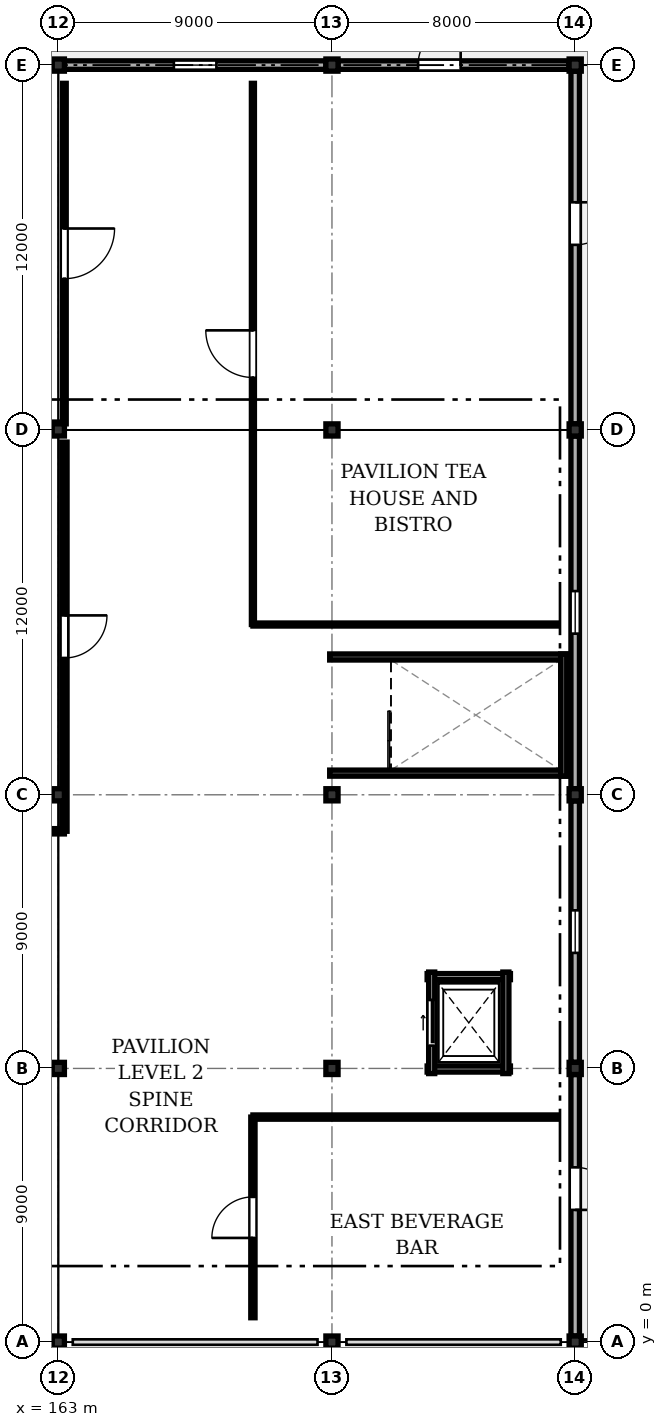
"""IFC4 building model, lengths in metres.
Left out: names, types, materials, properties, quantities, classifications, styles, units other than length and angle.
Written with IfcOpenShell. Run it as: python <this file> out.ifc"""

import sys

from ifc_helpers import new_model, si_unit, direction, frame, frame_2d, origin, origin_2d, place, context, subcontext, project, spatial, rectangle, i_section, extrude, element, fill, save


model = new_model("IFC4")
c1 = context("Model", 3, precision=1e-05, world=origin(), true_north=direction((0.0, 1.0)))
c2 = subcontext(c1, "Body", "Model", "MODEL_VIEW")
j1 = project(units=[si_unit("LENGTHUNIT", "METRE"), si_unit("PLANEANGLEUNIT", "RADIAN")], contexts=[c1])
p1 = place(None, origin())
s1 = spatial("IfcSite", under=j1, at=p1, CompositionType="ELEMENT")
p2 = place(p1, origin())
s2 = spatial("IfcBuilding", under=s1, at=p2, CompositionType="ELEMENT")
p3 = place(p2, frame((0.0, 0.0, 10.8)))
s3 = spatial("IfcBuildingStorey", under=s2, at=p3, CompositionType="ELEMENT", Elevation=10.8)
for number, where, z_axis, x_axis in (
    (1, (163.0, 0.0, 0.0), (0.0, 0.0, 1.0), (1.0, 0.0, 0.0)),
    (2, (163.0, 9.0, 0.0), (0.0, 0.0, 1.0), (1.0, 0.0, 0.0)),
    (3, (163.0, 18.0, 0.0), (0.0, 0.0, 1.0), (1.0, 0.0, 0.0)),
    (4, (163.0, 30.0, 0.0), (0.0, 0.0, 1.0), (1.0, 0.0, 0.0)),
    (5, (163.0, 42.0, 0.0), (0.0, 0.0, 1.0), (1.0, 0.0, 0.0)),
    (6, (172.0, 0.0, 0.0), (0.0, 0.0, 1.0), (1.0, 0.0, 0.0)),
    (7, (172.0, 9.0, 0.0), (0.0, 0.0, 1.0), (1.0, 0.0, 0.0)),
    (8, (172.0, 18.0, 0.0), (0.0, 0.0, 1.0), (1.0, 0.0, 0.0)),
    (9, (172.0, 30.0, 0.0), (0.0, 0.0, 1.0), (1.0, 0.0, 0.0)),
    (10, (172.0, 42.0, 0.0), (0.0, 0.0, 1.0), (1.0, 0.0, 0.0)),
    (11, (180.0, 0.0, 0.0), (0.0, 0.0, 1.0), (1.0, 0.0, 0.0)),
    (12, (180.0, 9.0, 0.0), (0.0, 0.0, 1.0), (1.0, 0.0, 0.0)),
    (13, (180.0, 18.0, 0.0), (0.0, 0.0, 1.0), (1.0, 0.0, 0.0)),
    (14, (180.0, 30.0, 0.0), (0.0, 0.0, 1.0), (1.0, 0.0, 0.0)),
    (15, (180.0, 42.0, 0.0), (0.0, 0.0, 1.0), (1.0, 0.0, 0.0)),
):
    element("IfcColumn", number, at=place(p3, frame(where, z_axis=z_axis, x_axis=x_axis)), inside=s3, PredefinedType="COLUMN", context=c2, shape_type="SweptSolid", body=[
        extrude(i_section(OverallWidth=0.4, OverallDepth=0.4, WebThickness=0.013, FlangeThickness=0.021, FilletRadius=0.022, at=origin_2d()), origin(), (0.0, 0.0, 1.0), 3.6),
    ])
p4 = place(p3, frame((163.2, 42.0, 0.0), z_axis=(0.0, 0.0, 1.0), x_axis=(1.0, 0.0, 0.0)))
e16 = element("IfcWall", 16, at=p4, inside=s3, PredefinedType="SOLIDWALL", context=c2, shape_type="SweptSolid", body=[
    extrude(rectangle(XDim=8.6, YDim=0.28, at=frame_2d((4.3, 0.0))), origin(), (0.0, 0.0, 1.0), 2.795),
])
p5 = place(p4, frame((3.6, 0.0, 0.75)))
e17 = element("IfcOpeningElement", 17, at=p5, cuts=e16, PredefinedType="OPENING", context=c2, shape_type="SweptSolid", body=[
    extrude(rectangle(XDim=1.4, YDim=1.55, at=frame_2d((0.7, 0.775))), frame((0.0, 0.15, 0.0), z_axis=(0.0, -1.0, 0.0), x_axis=(1.0, 0.0, 0.0)), (0.0, 0.0, 1.0), 0.3),
])
p6 = place(p3, frame((172.2, 42.0, 0.0), z_axis=(0.0, 0.0, 1.0), x_axis=(1.0, 0.0, 0.0)))
e18 = element("IfcWall", 18, at=p6, inside=s3, PredefinedType="SOLIDWALL", context=c2, shape_type="SweptSolid", body=[
    extrude(rectangle(XDim=7.6, YDim=0.28, at=frame_2d((3.8, 0.0))), origin(), (0.0, 0.0, 1.0), 2.795),
])
p7 = place(p6, frame((2.633, 0.0, 0.0)))
e19 = element("IfcOpeningElement", 19, at=p7, cuts=e18, PredefinedType="OPENING", context=c2, shape_type="SweptSolid", body=[
    extrude(rectangle(XDim=1.4, YDim=2.25, at=frame_2d((0.7, 1.125))), frame((0.0, 0.15, 0.0), z_axis=(0.0, -1.0, 0.0), x_axis=(1.0, 0.0, 0.0)), (0.0, 0.0, 1.0), 0.3),
])
p8 = place(p3, frame((180.0, 41.8, 0.0), z_axis=(0.0, 0.0, 1.0), x_axis=(0.0, -1.0, 0.0)))
e20 = element("IfcWall", 20, at=p8, inside=s3, PredefinedType="SOLIDWALL", context=c2, shape_type="SweptSolid", body=[
    extrude(rectangle(XDim=11.6, YDim=0.28, at=frame_2d((5.8, 0.0))), origin(), (0.0, 0.0, 1.0), 2.795),
])
p9 = place(p8, frame((4.313, 0.0, 0.0)))
e21 = element("IfcOpeningElement", 21, at=p9, cuts=e20, PredefinedType="OPENING", context=c2, shape_type="SweptSolid", body=[
    extrude(rectangle(XDim=1.4, YDim=2.25, at=frame_2d((0.7, 1.125))), frame((0.0, 0.15, 0.0), z_axis=(0.0, -1.0, 0.0), x_axis=(1.0, 0.0, 0.0)), (0.0, 0.0, 1.0), 0.3),
])
p10 = place(p3, frame((180.0, 29.8, 0.0), z_axis=(0.0, 0.0, 1.0), x_axis=(0.0, -1.0, 0.0)))
e22 = element("IfcWall", 22, at=p10, inside=s3, PredefinedType="SOLIDWALL", context=c2, shape_type="SweptSolid", body=[
    extrude(rectangle(XDim=11.6, YDim=0.28, at=frame_2d((5.8, 0.0))), origin(), (0.0, 0.0, 1.0), 2.795),
])
p11 = place(p10, frame((5.1, 0.0, 0.75)))
e23 = element("IfcOpeningElement", 23, at=p11, cuts=e22, PredefinedType="OPENING", context=c2, shape_type="SweptSolid", body=[
    extrude(rectangle(XDim=1.4, YDim=1.55, at=frame_2d((0.7, 0.775))), frame((0.0, 0.15, 0.0), z_axis=(0.0, -1.0, 0.0), x_axis=(1.0, 0.0, 0.0)), (0.0, 0.0, 1.0), 0.3),
])
p12 = place(p3, frame((180.0, 17.8, 0.0), z_axis=(0.0, 0.0, 1.0), x_axis=(0.0, -1.0, 0.0)))
e24 = element("IfcWall", 24, at=p12, inside=s3, PredefinedType="SOLIDWALL", context=c2, shape_type="SweptSolid", body=[
    extrude(rectangle(XDim=8.6, YDim=0.28, at=frame_2d((4.3, 0.0))), origin(), (0.0, 0.0, 1.0), 2.795),
])
p13 = place(p12, frame((3.6, 0.0, 0.75)))
e25 = element("IfcOpeningElement", 25, at=p13, cuts=e24, PredefinedType="OPENING", context=c2, shape_type="SweptSolid", body=[
    extrude(rectangle(XDim=1.4, YDim=1.55, at=frame_2d((0.7, 0.775))), frame((0.0, 0.15, 0.0), z_axis=(0.0, -1.0, 0.0), x_axis=(1.0, 0.0, 0.0)), (0.0, 0.0, 1.0), 0.3),
])
p14 = place(p3, frame((180.0, 8.8, 0.0), z_axis=(0.0, 0.0, 1.0), x_axis=(0.0, -1.0, 0.0)))
e26 = element("IfcWall", 26, at=p14, inside=s3, PredefinedType="SOLIDWALL", context=c2, shape_type="SweptSolid", body=[
    extrude(rectangle(XDim=8.6, YDim=0.28, at=frame_2d((4.3, 0.0))), origin(), (0.0, 0.0, 1.0), 2.885),
])
p15 = place(p14, frame((3.053, 0.0, 0.0)))
e27 = element("IfcOpeningElement", 27, at=p15, cuts=e26, PredefinedType="OPENING", context=c2, shape_type="SweptSolid", body=[
    extrude(rectangle(XDim=1.4, YDim=2.25, at=frame_2d((0.7, 1.125))), frame((0.0, 0.15, 0.0), z_axis=(0.0, -1.0, 0.0), x_axis=(1.0, 0.0, 0.0)), (0.0, 0.0, 1.0), 0.3),
])
for number, where, z_axis, x_axis in (
    (28, (171.925, 18.712, 0.0), (0.0, 0.0, 1.0), (1.0, 0.0, 0.0)),
    (29, (179.722, 22.532, 0.0), (0.0, 0.0, 1.0), (-1.0, 0.0, 0.0)),
):
    element("IfcWall", number, at=place(p3, frame(where, z_axis=z_axis, x_axis=x_axis)), inside=s3, PredefinedType="SOLIDWALL", context=c2, shape_type="SweptSolid", body=[
        extrude(rectangle(XDim=7.797, YDim=0.2, at=frame_2d((3.899, 0.0))), origin(), (0.0, 0.0, 1.0), 1.25),
    ])
p16 = place(p3, frame((179.623, 18.613, 0.0), z_axis=(0.0, 0.0, 1.0), x_axis=(0.0, 1.0, 0.0)))
e30 = element("IfcWall", 30, at=p16, inside=s3, PredefinedType="SOLIDWALL", context=c2, shape_type="SweptSolid", body=[
    extrude(rectangle(XDim=4.02, YDim=0.2, at=frame_2d((2.01, 0.0))), origin(), (0.0, 0.0, 1.0), 1.25),
])
for number, where, z_axis, x_axis in (
    (31, (175.13, 8.98, 0.0), (0.0, 0.0, 1.0), (1.0, 0.0, 0.0)),
    (32, (177.87, 12.02, 0.0), (0.0, 0.0, 1.0), (-1.0, 0.0, 0.0)),
):
    element("IfcWall", number, at=place(p3, frame(where, z_axis=z_axis, x_axis=x_axis)), inside=s3, PredefinedType="SOLIDWALL", context=c2, shape_type="SweptSolid", body=[
        extrude(rectangle(XDim=2.74, YDim=0.2, at=frame_2d((1.37, 0.0))), origin(), (0.0, 0.0, 1.0), 3.345),
    ])
p17 = place(p3, frame((175.28, 12.17, 0.0), z_axis=(0.0, 0.0, 1.0), x_axis=(0.0, -1.0, 0.0)))
e33 = element("IfcWall", 33, at=p17, inside=s3, PredefinedType="SOLIDWALL", context=c2, shape_type="SweptSolid", body=[
    extrude(rectangle(XDim=3.34, YDim=0.2, at=frame_2d((1.67, 0.0))), origin(), (0.0, 0.0, 1.0), 3.345),
])
p18 = place(p17, frame((0.92, 0.0, 0.0)))
e34 = element("IfcOpeningElement", 34, at=p18, cuts=e33, PredefinedType="OPENING", context=c2, shape_type="SweptSolid", body=[
    extrude(rectangle(XDim=1.5, YDim=2.2, at=frame_2d((0.75, 1.1))), frame((0.0, 0.11, 0.0), z_axis=(0.0, -1.0, 0.0), x_axis=(1.0, 0.0, 0.0)), (0.0, 0.0, 1.0), 0.22),
])
p19 = place(p3, frame((177.72, 8.83, 0.0), z_axis=(0.0, 0.0, 1.0), x_axis=(0.0, 1.0, 0.0)))
e35 = element("IfcWall", 35, at=p19, inside=s3, PredefinedType="SOLIDWALL", context=c2, shape_type="SweptSolid", body=[
    extrude(rectangle(XDim=3.34, YDim=0.2, at=frame_2d((1.67, 0.0))), origin(), (0.0, 0.0, 1.0), 3.345),
])
p20 = place(p3, frame((163.2, 30.2, 0.0), z_axis=(0.0, 0.0, 1.0), x_axis=(-1.0, 0.0, 0.0)))
e36 = element("IfcWall", 36, at=p20, inside=s3, PredefinedType="PARTITIONING", context=c2, shape_type="SweptSolid", body=[
    extrude(rectangle(XDim=26.4, YDim=0.12, at=frame_2d((13.2, 0.0))), origin(), (0.0, 0.0, 1.0), 2.795),
])
p21 = place(p3, frame((163.2, 41.4, 0.0), z_axis=(0.0, 0.0, 1.0), x_axis=(0.0, -1.0, 0.0)))
e37 = element("IfcWall", 37, at=p21, inside=s3, PredefinedType="PARTITIONING", context=c2, shape_type="SweptSolid", body=[
    extrude(rectangle(XDim=11.2, YDim=0.12, at=frame_2d((5.6, 0.0))), origin(), (0.0, 0.0, 1.0), 2.795),
])
p22 = place(p21, frame((4.775, 0.0, 0.0)))
e38 = element("IfcOpeningElement", 38, at=p22, cuts=e37, PredefinedType="OPENING", context=c2, shape_type="SweptSolid", body=[
    extrude(rectangle(XDim=1.65, YDim=2.1, at=frame_2d((0.825, 1.05))), frame((0.0, 0.07, 0.0), z_axis=(0.0, -1.0, 0.0), x_axis=(1.0, 0.0, 0.0)), (0.0, 0.0, 1.0), 0.14),
])
p23 = place(p3, frame((179.4, 23.6, 0.0), z_axis=(0.0, 0.0, 1.0), x_axis=(-1.0, 0.0, 0.0)))
e39 = element("IfcWall", 39, at=p23, inside=s3, PredefinedType="PARTITIONING", context=c2, shape_type="SweptSolid", body=[
    extrude(rectangle(XDim=10.0, YDim=0.1, at=frame_2d((5.0, 0.0))), origin(), (0.0, 0.0, 1.0), 2.795),
])
p24 = place(p3, frame((169.4, 23.6, 0.0), z_axis=(0.0, 0.0, 1.0), x_axis=(0.0, 1.0, 0.0)))
e40 = element("IfcWall", 40, at=p24, inside=s3, PredefinedType="PARTITIONING", context=c2, shape_type="SweptSolid", body=[
    extrude(rectangle(XDim=17.8, YDim=0.1, at=frame_2d((8.9, 0.0))), origin(), (0.0, 0.0, 1.0), 2.905),
])
p25 = place(p24, frame((8.125, 0.0, 0.0)))
e41 = element("IfcOpeningElement", 41, at=p25, cuts=e40, PredefinedType="OPENING", context=c2, shape_type="SweptSolid", body=[
    extrude(rectangle(XDim=1.55, YDim=2.1, at=frame_2d((0.775, 1.05))), frame((0.0, 0.06, 0.0), z_axis=(0.0, -1.0, 0.0), x_axis=(1.0, 0.0, 0.0)), (0.0, 0.0, 1.0), 0.12),
])
p26 = place(p3, frame((163.2, 16.8, 0.0), z_axis=(0.0, 0.0, 1.0), x_axis=(-1.0, 0.0, 0.0)))
e42 = element("IfcWall", 42, at=p26, inside=s3, PredefinedType="PARTITIONING", context=c2, shape_type="SweptSolid", body=[
    extrude(rectangle(XDim=10.6, YDim=0.175, at=frame_2d((5.3, 0.0))), origin(), (0.0, 0.0, 1.0), 2.985),
])
p27 = place(p3, frame((163.2, 29.6, 0.0), z_axis=(0.0, 0.0, 1.0), x_axis=(0.0, -1.0, 0.0)))
e43 = element("IfcWall", 43, at=p27, inside=s3, PredefinedType="PARTITIONING", context=c2, shape_type="SweptSolid", body=[
    extrude(rectangle(XDim=12.8, YDim=0.175, at=frame_2d((6.4, 0.0))), origin(), (0.0, 0.0, 1.0), 2.795),
])
p28 = place(p27, frame((5.7, 0.0, 0.0)))
e44 = element("IfcOpeningElement", 44, at=p28, cuts=e43, PredefinedType="OPENING", context=c2, shape_type="SweptSolid", body=[
    extrude(rectangle(XDim=1.4, YDim=2.1, at=frame_2d((0.7, 1.05))), frame((0.0, 0.097, 0.0), z_axis=(0.0, -1.0, 0.0), x_axis=(1.0, 0.0, 0.0)), (0.0, 0.0, 1.0), 0.195),
])
p29 = place(p3, frame((169.4, 7.4, 0.0), z_axis=(0.0, 0.0, 1.0), x_axis=(1.0, 0.0, 0.0)))
e45 = element("IfcWall", 45, at=p29, inside=s3, PredefinedType="PARTITIONING", context=c2, shape_type="SweptSolid", body=[
    extrude(rectangle(XDim=10.0, YDim=0.14, at=frame_2d((5.0, 0.0))), origin(), (0.0, 0.0, 1.0), 2.955),
])
p30 = place(p3, frame((169.4, 0.8, 0.0), z_axis=(0.0, 0.0, 1.0), x_axis=(0.0, 1.0, 0.0)))
e46 = element("IfcWall", 46, at=p30, inside=s3, PredefinedType="PARTITIONING", context=c2, shape_type="SweptSolid", body=[
    extrude(rectangle(XDim=6.6, YDim=0.14, at=frame_2d((3.3, 0.0))), origin(), (0.0, 0.0, 1.0), 2.915),
])
p31 = place(p30, frame((2.625, 0.0, 0.0)))
e47 = element("IfcOpeningElement", 47, at=p31, cuts=e46, PredefinedType="OPENING", context=c2, shape_type="SweptSolid", body=[
    extrude(rectangle(XDim=1.35, YDim=2.1, at=frame_2d((0.675, 1.05))), frame((0.0, 0.08, 0.0), z_axis=(0.0, -1.0, 0.0), x_axis=(1.0, 0.0, 0.0)), (0.0, 0.0, 1.0), 0.16),
])
p32 = place(p5, origin())
e48 = element("IfcWindow", 48, at=p32, inside=s3, PartitioningType="SINGLE_PANEL", PredefinedType="WINDOW", context=c2, shape_type="SweptSolid", body=[
    extrude(rectangle(XDim=1.4, YDim=1.55, at=frame_2d((0.7, 0.775))), frame((0.0, 0.03, 0.0), z_axis=(0.0, -1.0, 0.0), x_axis=(1.0, 0.0, 0.0)), (0.0, 0.0, 1.0), 0.06),
])
fill(e17, e48)
p33 = place(p7, origin())
e49 = element("IfcDoor", 49, at=p33, inside=s3, OperationType="SINGLE_SWING_RIGHT", PredefinedType="DOOR", context=c2, shape_type="SweptSolid", body=[
    extrude(rectangle(XDim=1.4, YDim=2.25, at=frame_2d((0.7, 1.125))), frame((0.0, 0.025, 0.0), z_axis=(0.0, -1.0, 0.0), x_axis=(1.0, 0.0, 0.0)), (0.0, 0.0, 1.0), 0.05),
])
fill(e19, e49)
p34 = place(p9, origin())
e50 = element("IfcDoor", 50, at=p34, inside=s3, OperationType="SINGLE_SWING_LEFT", PredefinedType="DOOR", context=c2, shape_type="SweptSolid", body=[
    extrude(rectangle(XDim=1.4, YDim=2.25, at=frame_2d((0.7, 1.125))), frame((0.0, 0.025, 0.0), z_axis=(0.0, -1.0, 0.0), x_axis=(1.0, 0.0, 0.0)), (0.0, 0.0, 1.0), 0.05),
])
fill(e21, e50)
p35 = place(p11, origin())
e51 = element("IfcWindow", 51, at=p35, inside=s3, PartitioningType="SINGLE_PANEL", PredefinedType="WINDOW", context=c2, shape_type="SweptSolid", body=[
    extrude(rectangle(XDim=1.4, YDim=1.55, at=frame_2d((0.7, 0.775))), frame((0.0, 0.03, 0.0), z_axis=(0.0, -1.0, 0.0), x_axis=(1.0, 0.0, 0.0)), (0.0, 0.0, 1.0), 0.06),
])
fill(e23, e51)
p36 = place(p13, origin())
e52 = element("IfcWindow", 52, at=p36, inside=s3, PartitioningType="SINGLE_PANEL", PredefinedType="WINDOW", context=c2, shape_type="SweptSolid", body=[
    extrude(rectangle(XDim=1.4, YDim=1.55, at=frame_2d((0.7, 0.775))), frame((0.0, 0.03, 0.0), z_axis=(0.0, -1.0, 0.0), x_axis=(1.0, 0.0, 0.0)), (0.0, 0.0, 1.0), 0.06),
])
fill(e25, e52)
p37 = place(p15, origin())
e53 = element("IfcDoor", 53, at=p37, inside=s3, OperationType="SINGLE_SWING_RIGHT", PredefinedType="DOOR", context=c2, shape_type="SweptSolid", body=[
    extrude(rectangle(XDim=1.4, YDim=2.25, at=frame_2d((0.7, 1.125))), frame((0.0, 0.025, 0.0), z_axis=(0.0, -1.0, 0.0), x_axis=(1.0, 0.0, 0.0)), (0.0, 0.0, 1.0), 0.05),
])
fill(e27, e53)
p38 = place(p18, origin())
e54 = element("IfcDoor", 54, at=p38, inside=s3, OperationType="SLIDING_TO_LEFT", PredefinedType="DOOR", context=c2, shape_type="SweptSolid", body=[
    extrude(rectangle(XDim=1.5, YDim=2.2, at=frame_2d((0.75, 1.1))), frame((0.0, 0.025, 0.0), z_axis=(0.0, -1.0, 0.0), x_axis=(1.0, 0.0, 0.0)), (0.0, 0.0, 1.0), 0.05),
])
fill(e34, e54)
p39 = place(p22, origin())
e55 = element("IfcDoor", 55, at=p39, inside=s3, OperationType="SINGLE_SWING_LEFT", PredefinedType="DOOR", context=c2, shape_type="SweptSolid", body=[
    extrude(rectangle(XDim=1.65, YDim=2.1, at=frame_2d((0.825, 1.05))), frame((0.0, 0.025, 0.0), z_axis=(0.0, -1.0, 0.0), x_axis=(1.0, 0.0, 0.0)), (0.0, 0.0, 1.0), 0.05),
])
fill(e38, e55)
p40 = place(p25, origin())
e56 = element("IfcDoor", 56, at=p40, inside=s3, OperationType="SINGLE_SWING_RIGHT", PredefinedType="DOOR", context=c2, shape_type="SweptSolid", body=[
    extrude(rectangle(XDim=1.55, YDim=2.1, at=frame_2d((0.775, 1.05))), frame((0.0, 0.025, 0.0), z_axis=(0.0, -1.0, 0.0), x_axis=(1.0, 0.0, 0.0)), (0.0, 0.0, 1.0), 0.05),
])
fill(e41, e56)
p41 = place(p28, origin())
e57 = element("IfcDoor", 57, at=p41, inside=s3, OperationType="SINGLE_SWING_LEFT", PredefinedType="DOOR", context=c2, shape_type="SweptSolid", body=[
    extrude(rectangle(XDim=1.4, YDim=2.1, at=frame_2d((0.7, 1.05))), frame((0.0, 0.025, 0.0), z_axis=(0.0, -1.0, 0.0), x_axis=(1.0, 0.0, 0.0)), (0.0, 0.0, 1.0), 0.05),
])
fill(e44, e57)
p42 = place(p31, origin())
e58 = element("IfcDoor", 58, at=p42, inside=s3, OperationType="SINGLE_SWING_LEFT", PredefinedType="DOOR", context=c2, shape_type="SweptSolid", body=[
    extrude(rectangle(XDim=1.35, YDim=2.1, at=frame_2d((0.675, 1.05))), frame((0.0, 0.025, 0.0), z_axis=(0.0, -1.0, 0.0), x_axis=(1.0, 0.0, 0.0)), (0.0, 0.0, 1.0), 0.05),
])
fill(e47, e58)
save(model, sys.argv[1])
